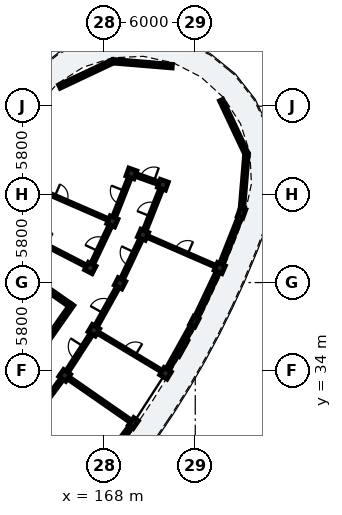
"""IFC4 building model, lengths in metres.
Left out: names, types, materials, properties, quantities, classifications, styles, units other than length and angle.
Written with IfcOpenShell. Run it as: python <this file> out.ifc"""

import sys

from ifc_helpers import new_model, si_unit, direction, frame, frame_2d, origin, origin_2d, place, context, subcontext, project, spatial, rectangle, extrude, element, fill, save


model = new_model("IFC4")
c1 = context("Model", 3, precision=1e-05, world=origin(), true_north=direction((0.0, 1.0)))
c2 = subcontext(c1, "Body", "Model", "MODEL_VIEW")
j1 = project(units=[si_unit("LENGTHUNIT", "METRE"), si_unit("PLANEANGLEUNIT", "RADIAN")], contexts=[c1])
p1 = place(None, origin())
s1 = spatial("IfcSite", under=j1, at=p1, CompositionType="ELEMENT")
p2 = place(p1, origin())
s2 = spatial("IfcBuilding", under=s1, at=p2, CompositionType="ELEMENT")
p3 = place(p2, frame((0.0, 0.0, 22.28)))
s3 = spatial("IfcBuildingStorey", under=s2, at=p3, CompositionType="ELEMENT", Elevation=22.28)
p4 = place(p3, frame((165.733, 38.336, 0.0), z_axis=(0.0, 0.0, 1.0), x_axis=(-0.819153711596, 0.573574055182, 0.0)))
e1 = element("IfcWall", 1, at=p4, inside=s3, PredefinedType="SHEAR", context=c2, shape_type="SweptSolid", body=[
    extrude(rectangle(XDim=6.6, YDim=0.25, at=frame_2d((3.3, 0.0))), origin(), (0.0, 0.0, 1.0), 3.11),
])
p5 = place(p3, frame((165.907, 38.366, 0.0), z_axis=(0.0, 0.0, 1.0), x_axis=(-0.573582112484, -0.819148069789, 0.0)))
e2 = element("IfcWall", 2, at=p5, inside=s3, PredefinedType="SHEAR", context=c2, shape_type="SweptSolid", body=[
    extrude(rectangle(XDim=3.42, YDim=0.25, at=frame_2d((1.71, 0.0))), origin(), (0.0, 0.0, 1.0), 3.11),
])
p6 = place(p3, frame((165.41, 33.692, 0.0), z_axis=(0.0, 0.0, 1.0), x_axis=(0.821646937942, -0.569996762596, 0.0)))
e3 = element("IfcColumn", 3, at=p6, inside=s3, PredefinedType="COLUMN", context=c2, shape_type="SweptSolid", body=[
    extrude(rectangle(XDim=0.56, YDim=0.56, at=origin_2d()), origin(), (0.0, 0.0, 1.0), 3.11),
])
p7 = place(p3, frame((169.929, 30.557, 0.0), z_axis=(0.0, 0.0, 1.0), x_axis=(0.821646937942, -0.569996762596, 0.0)))
e4 = element("IfcColumn", 4, at=p7, inside=s3, PredefinedType="PILASTER", context=c2, shape_type="SweptSolid", body=[
    extrude(rectangle(XDim=0.38, YDim=0.62, at=origin_2d()), origin(), (0.0, 0.0, 1.0), 3.11),
])
for number, where, z_axis, x_axis in (
    (5, (167.33, 36.662, 0.0), (0.0, 0.0, 1.0), (0.857, -0.515, 0.0)),
    (6, (172.044, 33.83, 0.0), (0.0, 0.0, 1.0), (0.857, -0.515, 0.0)),
    (7, (167.095, 40.759, 0.0), (0.0, 0.0, 1.0), (0.889, -0.458, 0.0)),
    (8, (169.051, 39.752, 0.0), (0.0, 0.0, 1.0), (0.889, -0.458, 0.0)),
):
    element("IfcColumn", number, at=place(p3, frame(where, z_axis=z_axis, x_axis=x_axis)), inside=s3, PredefinedType="COLUMN", context=c2, shape_type="SweptSolid", body=[
        extrude(rectangle(XDim=0.56, YDim=0.56, at=origin_2d()), origin(), (0.0, 0.0, 1.0), 3.11),
    ])
p8 = place(p3, frame((173.941, 37.234, 0.0), z_axis=(0.0, 0.0, 1.0), x_axis=(0.889017141486, -0.457873915117, 0.0)))
e9 = element("IfcColumn", 9, at=p8, inside=s3, PredefinedType="PILASTER", context=c2, shape_type="SweptSolid", body=[
    extrude(rectangle(XDim=0.38, YDim=0.62, at=origin_2d()), origin(), (0.0, 0.0, 1.0), 3.11),
])
for number, where, z_axis, x_axis in (
    (10, (168.55, 43.825, 0.0), (0.0, 0.0, 1.0), (0.917, -0.399, 0.0)),
    (11, (170.567, 42.948, 0.0), (0.0, 0.0, 1.0), (0.917, -0.399, 0.0)),
    (12, (175.611, 40.754, 0.0), (0.0, 0.0, 1.0), (0.917, -0.399, 0.0)),
    (13, (169.8, 46.979, 0.0), (0.0, 0.0, 1.0), (0.941, -0.338, 0.0)),
    (14, (171.871, 46.236, 0.0), (0.0, 0.0, 1.0), (0.941, -0.338, 0.0)),
):
    element("IfcColumn", number, at=place(p3, frame(where, z_axis=z_axis, x_axis=x_axis)), inside=s3, PredefinedType="COLUMN", context=c2, shape_type="SweptSolid", body=[
        extrude(rectangle(XDim=0.56, YDim=0.56, at=origin_2d()), origin(), (0.0, 0.0, 1.0), 3.11),
    ])
p9 = place(p3, frame((177.047, 44.377, 0.0), z_axis=(0.0, 0.0, 1.0), x_axis=(0.941176015256, -0.337916718003, 0.0)))
e15 = element("IfcColumn", 15, at=p9, inside=s3, PredefinedType="PILASTER", context=c2, shape_type="SweptSolid", body=[
    extrude(rectangle(XDim=0.38, YDim=0.62, at=origin_2d()), origin(), (0.0, 0.0, 1.0), 3.11),
])
p10 = place(p3, frame((167.753, 27.63, 0.0), z_axis=(0.0, 0.0, 1.0), x_axis=(0.596611432616, 0.802530247699, 0.0)))
e16 = element("IfcWall", 16, at=p10, inside=s3, PredefinedType="SOLIDWALL", context=c2, shape_type="SweptSolid", body=[
    extrude(rectangle(XDim=3.487, YDim=0.24, at=frame_2d((1.743, 0.0))), origin(), (0.0, 0.0, 1.0), 2.355),
])
p11 = place(p10, frame((1.153, 0.0, 0.55)))
e17 = element("IfcOpeningElement", 17, at=p11, cuts=e16, PredefinedType="OPENING", context=c2, shape_type="SweptSolid", body=[
    extrude(rectangle(XDim=1.18, YDim=1.48, at=frame_2d((0.59, 0.74))), frame((0.0, 0.13, 0.0), z_axis=(0.0, -1.0, 0.0), x_axis=(1.0, 0.0, 0.0)), (0.0, 0.0, 1.0), 0.26),
])
p12 = place(p3, frame((172.166, 34.048, 0.0), z_axis=(0.0, 0.0, 1.0), x_axis=(0.486706738221, 0.87356542455, 0.0)))
e18 = element("IfcWall", 18, at=p12, inside=s3, PredefinedType="SOLIDWALL", context=c2, shape_type="SweptSolid", body=[
    extrude(rectangle(XDim=3.487, YDim=0.24, at=frame_2d((1.743, 0.0))), origin(), (0.0, 0.0, 1.0), 2.355),
])
p13 = place(p12, frame((1.143, 0.0, 0.55)))
e19 = element("IfcOpeningElement", 19, at=p13, cuts=e18, PredefinedType="OPENING", context=c2, shape_type="SweptSolid", body=[
    extrude(rectangle(XDim=1.2, YDim=1.51, at=frame_2d((0.6, 0.755))), frame((0.0, 0.13, 0.0), z_axis=(0.0, -1.0, 0.0), x_axis=(1.0, 0.0, 0.0)), (0.0, 0.0, 1.0), 0.26),
])
p14 = place(p3, frame((174.01, 37.378, 0.0), z_axis=(0.0, 0.0, 1.0), x_axis=(0.428576879122, 0.903505317462, 0.0)))
e20 = element("IfcWall", 20, at=p14, inside=s3, PredefinedType="SOLIDWALL", context=c2, shape_type="SweptSolid", body=[
    extrude(rectangle(XDim=3.487, YDim=0.24, at=frame_2d((1.743, 0.0))), origin(), (0.0, 0.0, 1.0), 2.355),
])
p15 = place(p14, frame((1.083, 0.0, 0.55)))
e21 = element("IfcOpeningElement", 21, at=p15, cuts=e20, PredefinedType="OPENING", context=c2, shape_type="SweptSolid", body=[
    extrude(rectangle(XDim=1.32, YDim=1.585, at=frame_2d((0.66, 0.792))), frame((0.0, 0.13, 0.0), z_axis=(0.0, -1.0, 0.0), x_axis=(1.0, 0.0, 0.0)), (0.0, 0.0, 1.0), 0.26),
])
p16 = place(p3, frame((175.703, 40.987, 0.0), z_axis=(0.0, 0.0, 1.0), x_axis=(0.368503667074, 0.929626294461, 0.0)))
e22 = element("IfcWall", 22, at=p16, inside=s3, PredefinedType="SOLIDWALL", context=c2, shape_type="SweptSolid", body=[
    extrude(rectangle(XDim=3.487, YDim=0.24, at=frame_2d((1.743, 0.0))), origin(), (0.0, 0.0, 1.0), 2.355),
])
p17 = place(p16, frame((1.023, 0.0, 0.35)))
e23 = element("IfcOpeningElement", 23, at=p17, cuts=e22, PredefinedType="OPENING", context=c2, shape_type="SweptSolid", body=[
    extrude(rectangle(XDim=1.44, YDim=1.66, at=frame_2d((0.72, 0.83))), frame((0.0, 0.13, 0.0), z_axis=(0.0, -1.0, 0.0), x_axis=(1.0, 0.0, 0.0)), (0.0, 0.0, 1.0), 0.26),
])
p18 = place(p3, frame((165.063, 52.691, 0.0), z_axis=(0.0, 0.0, 1.0), x_axis=(0.904437504678, 0.426606141694, 0.0)))
e24 = element("IfcWall", 24, at=p18, inside=s3, PredefinedType="SOLIDWALL", context=c2, shape_type="SweptSolid", body=[
    extrude(rectangle(XDim=3.908, YDim=0.24, at=frame_2d((1.954, 0.0))), origin(), (0.0, 0.0, 1.0), 2.355),
])
p19 = place(p18, frame((0.979, 0.0, 0.4)))
e25 = element("IfcOpeningElement", 25, at=p19, cuts=e24, PredefinedType="OPENING", context=c2, shape_type="SweptSolid", body=[
    extrude(rectangle(XDim=1.95, YDim=1.78, at=frame_2d((0.975, 0.89))), frame((0.0, 0.13, 0.0), z_axis=(0.0, -1.0, 0.0), x_axis=(1.0, 0.0, 0.0)), (0.0, 0.0, 1.0), 0.26),
])
p20 = place(p3, frame((168.598, 54.358, 0.0), z_axis=(0.0, 0.0, 1.0), x_axis=(0.99656339927, -0.082833515165, 0.0)))
e26 = element("IfcWall", 26, at=p20, inside=s3, PredefinedType="SOLIDWALL", context=c2, shape_type="SweptSolid", body=[
    extrude(rectangle(XDim=3.908, YDim=0.24, at=frame_2d((1.954, 0.0))), origin(), (0.0, 0.0, 1.0), 2.355),
])
p21 = place(p3, frame((175.704, 51.807, 0.0), z_axis=(0.0, 0.0, 1.0), x_axis=(0.42653093848, -0.904472972796, 0.0)))
e27 = element("IfcWall", 27, at=p21, inside=s3, PredefinedType="SOLIDWALL", context=c2, shape_type="SweptSolid", body=[
    extrude(rectangle(XDim=3.908, YDim=0.24, at=frame_2d((1.954, 0.0))), origin(), (0.0, 0.0, 1.0), 2.355),
])
p22 = place(p21, frame((0.979, 0.0, 0.4)))
e28 = element("IfcOpeningElement", 28, at=p22, cuts=e27, PredefinedType="OPENING", context=c2, shape_type="SweptSolid", body=[
    extrude(rectangle(XDim=1.95, YDim=1.78, at=frame_2d((0.975, 0.89))), frame((0.0, 0.13, 0.0), z_axis=(0.0, -1.0, 0.0), x_axis=(1.0, 0.0, 0.0)), (0.0, 0.0, 1.0), 0.26),
])
p23 = place(p3, frame((177.371, 48.272, 0.0), z_axis=(0.0, 0.0, 1.0), x_axis=(-0.082771474592, -0.996568554086, 0.0)))
e29 = element("IfcWall", 29, at=p23, inside=s3, PredefinedType="SOLIDWALL", context=c2, shape_type="SweptSolid", body=[
    extrude(rectangle(XDim=3.908, YDim=0.24, at=frame_2d((1.954, 0.0))), origin(), (0.0, 0.0, 1.0), 2.355),
])
p24 = place(p3, frame((163.509, 31.134, 0.0), z_axis=(0.0, 0.0, 1.0), x_axis=(0.596552136601, 0.802574325727, 0.0)))
e30 = element("IfcWall", 30, at=p24, inside=s3, PredefinedType="PARTITIONING", context=c2, shape_type="SweptSolid", body=[
    extrude(rectangle(XDim=2.837, YDim=0.195, at=frame_2d((1.418, 0.0))), origin(), (0.0, 0.0, 1.0), 2.37),
])
p25 = place(p24, frame((0.954, 0.0, 0.0)))
e31 = element("IfcOpeningElement", 31, at=p25, cuts=e30, PredefinedType="OPENING", context=c2, shape_type="SweptSolid", body=[
    extrude(rectangle(XDim=0.93, YDim=2.12, at=frame_2d((0.465, 1.06))), frame((0.0, 0.107, 0.0), z_axis=(0.0, -1.0, 0.0), x_axis=(1.0, 0.0, 0.0)), (0.0, 0.0, 1.0), 0.215),
])
p26 = place(p3, frame((165.739, 33.464, 0.0), z_axis=(0.0, 0.0, 1.0), x_axis=(0.821638260647, -0.570009270663, 0.0)))
e32 = element("IfcWall", 32, at=p26, inside=s3, PredefinedType="PARTITIONING", context=c2, shape_type="SweptSolid", body=[
    extrude(rectangle(XDim=4.7, YDim=0.175, at=frame_2d((2.35, 0.0))), origin(), (0.0, 0.0, 1.0), 2.37),
])
p27 = place(p3, frame((165.6, 33.986, 0.0), z_axis=(0.0, 0.0, 1.0), x_axis=(0.542787304957, 0.83987019329, 0.0)))
e33 = element("IfcWall", 33, at=p27, inside=s3, PredefinedType="PARTITIONING", context=c2, shape_type="SweptSolid", body=[
    extrude(rectangle(XDim=2.837, YDim=0.195, at=frame_2d((1.418, 0.0))), origin(), (0.0, 0.0, 1.0), 2.37),
])
p28 = place(p27, frame((0.924, 0.0, 0.0)))
e34 = element("IfcOpeningElement", 34, at=p28, cuts=e33, PredefinedType="OPENING", context=c2, shape_type="SweptSolid", body=[
    extrude(rectangle(XDim=0.99, YDim=2.16, at=frame_2d((0.495, 1.08))), frame((0.0, 0.107, 0.0), z_axis=(0.0, -1.0, 0.0), x_axis=(1.0, 0.0, 0.0)), (0.0, 0.0, 1.0), 0.215),
])
p29 = place(p3, frame((167.673, 36.456, 0.0), z_axis=(0.0, 0.0, 1.0), x_axis=(0.857139805444, -0.515083831937, 0.0)))
e35 = element("IfcWall", 35, at=p29, inside=s3, PredefinedType="PARTITIONING", context=c2, shape_type="SweptSolid", body=[
    extrude(rectangle(XDim=4.7, YDim=0.125, at=frame_2d((2.35, 0.0))), origin(), (0.0, 0.0, 1.0), 2.37),
])
p30 = place(p29, frame((1.915, 0.0, 0.0)))
e36 = element("IfcOpeningElement", 36, at=p30, cuts=e35, PredefinedType="OPENING", context=c2, shape_type="SweptSolid", body=[
    extrude(rectangle(XDim=0.87, YDim=2.08, at=frame_2d((0.435, 1.04))), frame((0.0, 0.073, 0.0), z_axis=(0.0, -1.0, 0.0), x_axis=(1.0, 0.0, 0.0)), (0.0, 0.0, 1.0), 0.145),
])
p31 = place(p3, frame((167.5, 36.968, 0.0), z_axis=(0.0, 0.0, 1.0), x_axis=(0.48673124079, 0.8735517725, 0.0)))
e37 = element("IfcWall", 37, at=p31, inside=s3, PredefinedType="PARTITIONING", context=c2, shape_type="SweptSolid", body=[
    extrude(rectangle(XDim=2.837, YDim=0.195, at=frame_2d((1.418, 0.0))), origin(), (0.0, 0.0, 1.0), 2.37),
])
p32 = place(p31, frame((0.934, 0.0, 0.0)))
e38 = element("IfcOpeningElement", 38, at=p32, cuts=e37, PredefinedType="OPENING", context=c2, shape_type="SweptSolid", body=[
    extrude(rectangle(XDim=0.97, YDim=2.15, at=frame_2d((0.485, 1.075))), frame((0.0, 0.107, 0.0), z_axis=(0.0, -1.0, 0.0), x_axis=(1.0, 0.0, 0.0)), (0.0, 0.0, 1.0), 0.215),
])
p33 = place(p3, frame((160.872, 43.964, 0.0), z_axis=(0.0, 0.0, 1.0), x_axis=(0.889022010753, -0.457864460727, 0.0)))
e39 = element("IfcWall", 39, at=p33, inside=s3, PredefinedType="PARTITIONING", context=c2, shape_type="SweptSolid", body=[
    extrude(rectangle(XDim=6.6, YDim=0.125, at=frame_2d((3.3, 0.0))), origin(), (0.0, 0.0, 1.0), 2.37),
])
p34 = place(p33, frame((2.855, 0.0, 0.0)))
e40 = element("IfcOpeningElement", 40, at=p34, cuts=e39, PredefinedType="OPENING", context=c2, shape_type="SweptSolid", body=[
    extrude(rectangle(XDim=0.89, YDim=2.1, at=frame_2d((0.445, 1.05))), frame((0.0, 0.073, 0.0), z_axis=(0.0, -1.0, 0.0), x_axis=(1.0, 0.0, 0.0)), (0.0, 0.0, 1.0), 0.145),
])
p35 = place(p3, frame((169.201, 40.068, 0.0), z_axis=(0.0, 0.0, 1.0), x_axis=(0.428493237107, 0.903544988229, 0.0)))
e41 = element("IfcWall", 41, at=p35, inside=s3, PredefinedType="PARTITIONING", context=c2, shape_type="SweptSolid", body=[
    extrude(rectangle(XDim=2.837, YDim=0.195, at=frame_2d((1.418, 0.0))), origin(), (0.0, 0.0, 1.0), 2.37),
])
p36 = place(p35, frame((0.944, 0.0, 0.0)))
e42 = element("IfcOpeningElement", 42, at=p36, cuts=e41, PredefinedType="OPENING", context=c2, shape_type="SweptSolid", body=[
    extrude(rectangle(XDim=0.95, YDim=2.13, at=frame_2d((0.475, 1.065))), frame((0.0, 0.107, 0.0), z_axis=(0.0, -1.0, 0.0), x_axis=(1.0, 0.0, 0.0)), (0.0, 0.0, 1.0), 0.215),
])
p37 = place(p3, frame((167.246, 41.075, 0.0), z_axis=(0.0, 0.0, 1.0), x_axis=(0.428550049392, 0.903518043631, 0.0)))
e43 = element("IfcWall", 43, at=p37, inside=s3, PredefinedType="PARTITIONING", context=c2, shape_type="SweptSolid", body=[
    extrude(rectangle(XDim=2.693, YDim=0.195, at=frame_2d((1.346, 0.0))), origin(), (0.0, 0.0, 1.0), 2.37),
])
p38 = place(p37, frame((0.872, 0.0, 0.0)))
e44 = element("IfcOpeningElement", 44, at=p38, cuts=e43, PredefinedType="OPENING", context=c2, shape_type="SweptSolid", body=[
    extrude(rectangle(XDim=0.95, YDim=2.13, at=frame_2d((0.475, 1.065))), frame((0.0, 0.107, 0.0), z_axis=(0.0, -1.0, 0.0), x_axis=(1.0, 0.0, 0.0)), (0.0, 0.0, 1.0), 0.215),
])
p39 = place(p3, frame((170.934, 42.788, 0.0), z_axis=(0.0, 0.0, 1.0), x_axis=(0.917071707884, -0.398722312643, 0.0)))
e45 = element("IfcWall", 45, at=p39, inside=s3, PredefinedType="PARTITIONING", context=c2, shape_type="SweptSolid", body=[
    extrude(rectangle(XDim=4.7, YDim=0.125, at=frame_2d((2.35, 0.0))), origin(), (0.0, 0.0, 1.0), 2.37),
])
p40 = place(p39, frame((1.905, 0.0, 0.0)))
e46 = element("IfcOpeningElement", 46, at=p40, cuts=e45, PredefinedType="OPENING", context=c2, shape_type="SweptSolid", body=[
    extrude(rectangle(XDim=0.89, YDim=2.1, at=frame_2d((0.445, 1.05))), frame((0.0, 0.073, 0.0), z_axis=(0.0, -1.0, 0.0), x_axis=(1.0, 0.0, 0.0)), (0.0, 0.0, 1.0), 0.145),
])
p41 = place(p3, frame((162.13, 46.616, 0.0), z_axis=(0.0, 0.0, 1.0), x_axis=(0.9170582943, -0.398753162817, 0.0)))
e47 = element("IfcWall", 47, at=p41, inside=s3, PredefinedType="PARTITIONING", context=c2, shape_type="SweptSolid", body=[
    extrude(rectangle(XDim=6.6, YDim=0.125, at=frame_2d((3.3, 0.0))), origin(), (0.0, 0.0, 1.0), 2.37),
])
p42 = place(p41, frame((2.865, 0.0, 0.0)))
e48 = element("IfcOpeningElement", 48, at=p42, cuts=e47, PredefinedType="OPENING", context=c2, shape_type="SweptSolid", body=[
    extrude(rectangle(XDim=0.87, YDim=2.08, at=frame_2d((0.435, 1.04))), frame((0.0, 0.073, 0.0), z_axis=(0.0, -1.0, 0.0), x_axis=(1.0, 0.0, 0.0)), (0.0, 0.0, 1.0), 0.145),
])
p43 = place(p3, frame((170.696, 43.273, 0.0), z_axis=(0.0, 0.0, 1.0), x_axis=(0.368584691693, 0.929594172233, 0.0)))
e49 = element("IfcWall", 49, at=p43, inside=s3, PredefinedType="PARTITIONING", context=c2, shape_type="SweptSolid", body=[
    extrude(rectangle(XDim=2.837, YDim=0.195, at=frame_2d((1.418, 0.0))), origin(), (0.0, 0.0, 1.0), 2.37),
])
p44 = place(p43, frame((0.954, 0.0, 0.0)))
e50 = element("IfcOpeningElement", 50, at=p44, cuts=e49, PredefinedType="OPENING", context=c2, shape_type="SweptSolid", body=[
    extrude(rectangle(XDim=0.93, YDim=2.12, at=frame_2d((0.465, 1.06))), frame((0.0, 0.107, 0.0), z_axis=(0.0, -1.0, 0.0), x_axis=(1.0, 0.0, 0.0)), (0.0, 0.0, 1.0), 0.215),
])
p45 = place(p3, frame((168.678, 44.15, 0.0), z_axis=(0.0, 0.0, 1.0), x_axis=(0.368528468945, 0.929616462622, 0.0)))
e51 = element("IfcWall", 51, at=p45, inside=s3, PredefinedType="PARTITIONING", context=c2, shape_type="SweptSolid", body=[
    extrude(rectangle(XDim=2.693, YDim=0.195, at=frame_2d((1.346, 0.0))), origin(), (0.0, 0.0, 1.0), 2.37),
])
p46 = place(p45, frame((0.882, 0.0, 0.0)))
e52 = element("IfcOpeningElement", 52, at=p46, cuts=e51, PredefinedType="OPENING", context=c2, shape_type="SweptSolid", body=[
    extrude(rectangle(XDim=0.93, YDim=2.12, at=frame_2d((0.465, 1.06))), frame((0.0, 0.107, 0.0), z_axis=(0.0, -1.0, 0.0), x_axis=(1.0, 0.0, 0.0)), (0.0, 0.0, 1.0), 0.215),
])
p47 = place(p3, frame((169.847, 46.962, 0.0), z_axis=(0.0, 0.0, 1.0), x_axis=(0.941167179085, -0.337941327767, 0.0)))
e53 = element("IfcWall", 53, at=p47, inside=s3, PredefinedType="PARTITIONING", context=c2, shape_type="SweptSolid", body=[
    extrude(rectangle(XDim=2.1, YDim=0.195, at=frame_2d((1.05, 0.0))), origin(), (0.0, 0.0, 1.0), 2.37),
])
p48 = place(p47, frame((0.57, 0.0, 0.0)))
e54 = element("IfcOpeningElement", 54, at=p48, cuts=e53, PredefinedType="OPENING", context=c2, shape_type="SweptSolid", body=[
    extrude(rectangle(XDim=0.95, YDim=2.13, at=frame_2d((0.475, 1.065))), frame((0.0, 0.107, 0.0), z_axis=(0.0, -1.0, 0.0), x_axis=(1.0, 0.0, 0.0)), (0.0, 0.0, 1.0), 0.215),
])
p49 = place(p13, origin())
e55 = element("IfcWindow", 55, at=p49, inside=s3, PartitioningType="SINGLE_PANEL", PredefinedType="WINDOW", context=c2, shape_type="SweptSolid", body=[
    extrude(rectangle(XDim=1.2, YDim=1.51, at=frame_2d((0.6, 0.755))), frame((0.0, 0.03, 0.0), z_axis=(0.0, -1.0, 0.0), x_axis=(1.0, 0.0, 0.0)), (0.0, 0.0, 1.0), 0.06),
])
fill(e19, e55)
p50 = place(p15, origin())
e56 = element("IfcWindow", 56, at=p50, inside=s3, PartitioningType="SINGLE_PANEL", PredefinedType="WINDOW", context=c2, shape_type="SweptSolid", body=[
    extrude(rectangle(XDim=1.32, YDim=1.585, at=frame_2d((0.66, 0.792))), frame((0.0, 0.03, 0.0), z_axis=(0.0, -1.0, 0.0), x_axis=(1.0, 0.0, 0.0)), (0.0, 0.0, 1.0), 0.06),
])
fill(e21, e56)
p51 = place(p17, origin())
e57 = element("IfcWindow", 57, at=p51, inside=s3, PartitioningType="SINGLE_PANEL", PredefinedType="WINDOW", context=c2, shape_type="SweptSolid", body=[
    extrude(rectangle(XDim=1.44, YDim=1.66, at=frame_2d((0.72, 0.83))), frame((0.0, 0.03, 0.0), z_axis=(0.0, -1.0, 0.0), x_axis=(1.0, 0.0, 0.0)), (0.0, 0.0, 1.0), 0.06),
])
fill(e23, e57)
p52 = place(p19, origin())
e58 = element("IfcWindow", 58, at=p52, inside=s3, PartitioningType="SINGLE_PANEL", PredefinedType="WINDOW", context=c2, shape_type="SweptSolid", body=[
    extrude(rectangle(XDim=1.95, YDim=1.78, at=frame_2d((0.975, 0.89))), frame((0.0, 0.03, 0.0), z_axis=(0.0, -1.0, 0.0), x_axis=(1.0, 0.0, 0.0)), (0.0, 0.0, 1.0), 0.06),
])
fill(e25, e58)
p53 = place(p22, origin())
e59 = element("IfcWindow", 59, at=p53, inside=s3, PartitioningType="SINGLE_PANEL", PredefinedType="WINDOW", context=c2, shape_type="SweptSolid", body=[
    extrude(rectangle(XDim=1.95, YDim=1.78, at=frame_2d((0.975, 0.89))), frame((0.0, 0.03, 0.0), z_axis=(0.0, -1.0, 0.0), x_axis=(1.0, 0.0, 0.0)), (0.0, 0.0, 1.0), 0.06),
])
fill(e28, e59)
p54 = place(p25, origin())
e60 = element("IfcDoor", 60, at=p54, inside=s3, OperationType="SINGLE_SWING_LEFT", PredefinedType="DOOR", context=c2, shape_type="SweptSolid", body=[
    extrude(rectangle(XDim=0.93, YDim=2.12, at=frame_2d((0.465, 1.06))), frame((0.0, 0.025, 0.0), z_axis=(0.0, -1.0, 0.0), x_axis=(1.0, 0.0, 0.0)), (0.0, 0.0, 1.0), 0.05),
])
fill(e31, e60)
p55 = place(p28, origin())
e61 = element("IfcDoor", 61, at=p55, inside=s3, OperationType="SINGLE_SWING_RIGHT", PredefinedType="DOOR", context=c2, shape_type="SweptSolid", body=[
    extrude(rectangle(XDim=0.99, YDim=2.16, at=frame_2d((0.495, 1.08))), frame((0.0, 0.025, 0.0), z_axis=(0.0, -1.0, 0.0), x_axis=(1.0, 0.0, 0.0)), (0.0, 0.0, 1.0), 0.05),
])
fill(e34, e61)
p56 = place(p30, origin())
e62 = element("IfcDoor", 62, at=p56, inside=s3, OperationType="SINGLE_SWING_RIGHT", PredefinedType="DOOR", context=c2, shape_type="SweptSolid", body=[
    extrude(rectangle(XDim=0.87, YDim=2.08, at=frame_2d((0.435, 1.04))), frame((0.0, 0.025, 0.0), z_axis=(0.0, -1.0, 0.0), x_axis=(1.0, 0.0, 0.0)), (0.0, 0.0, 1.0), 0.05),
])
fill(e36, e62)
p57 = place(p32, origin())
e63 = element("IfcDoor", 63, at=p57, inside=s3, OperationType="SINGLE_SWING_LEFT", PredefinedType="DOOR", context=c2, shape_type="SweptSolid", body=[
    extrude(rectangle(XDim=0.97, YDim=2.15, at=frame_2d((0.485, 1.075))), frame((0.0, 0.025, 0.0), z_axis=(0.0, -1.0, 0.0), x_axis=(1.0, 0.0, 0.0)), (0.0, 0.0, 1.0), 0.05),
])
fill(e38, e63)
p58 = place(p36, origin())
e64 = element("IfcDoor", 64, at=p58, inside=s3, OperationType="SINGLE_SWING_RIGHT", PredefinedType="DOOR", context=c2, shape_type="SweptSolid", body=[
    extrude(rectangle(XDim=0.95, YDim=2.13, at=frame_2d((0.475, 1.065))), frame((0.0, 0.025, 0.0), z_axis=(0.0, -1.0, 0.0), x_axis=(1.0, 0.0, 0.0)), (0.0, 0.0, 1.0), 0.05),
])
fill(e42, e64)
p59 = place(p38, origin())
e65 = element("IfcDoor", 65, at=p59, inside=s3, OperationType="SINGLE_SWING_LEFT", PredefinedType="DOOR", context=c2, shape_type="SweptSolid", body=[
    extrude(rectangle(XDim=0.95, YDim=2.13, at=frame_2d((0.475, 1.065))), frame((0.0, 0.025, 0.0), z_axis=(0.0, -1.0, 0.0), x_axis=(1.0, 0.0, 0.0)), (0.0, 0.0, 1.0), 0.05),
])
fill(e44, e65)
p60 = place(p40, origin())
e66 = element("IfcDoor", 66, at=p60, inside=s3, OperationType="SINGLE_SWING_RIGHT", PredefinedType="DOOR", context=c2, shape_type="SweptSolid", body=[
    extrude(rectangle(XDim=0.89, YDim=2.1, at=frame_2d((0.445, 1.05))), frame((0.0, 0.025, 0.0), z_axis=(0.0, -1.0, 0.0), x_axis=(1.0, 0.0, 0.0)), (0.0, 0.0, 1.0), 0.05),
])
fill(e46, e66)
p61 = place(p42, origin())
e67 = element("IfcDoor", 67, at=p61, inside=s3, OperationType="SINGLE_SWING_LEFT", PredefinedType="DOOR", context=c2, shape_type="SweptSolid", body=[
    extrude(rectangle(XDim=0.87, YDim=2.08, at=frame_2d((0.435, 1.04))), frame((0.0, 0.025, 0.0), z_axis=(0.0, -1.0, 0.0), x_axis=(1.0, 0.0, 0.0)), (0.0, 0.0, 1.0), 0.05),
])
fill(e48, e67)
p62 = place(p44, origin())
e68 = element("IfcDoor", 68, at=p62, inside=s3, OperationType="SINGLE_SWING_LEFT", PredefinedType="DOOR", context=c2, shape_type="SweptSolid", body=[
    extrude(rectangle(XDim=0.93, YDim=2.12, at=frame_2d((0.465, 1.06))), frame((0.0, 0.025, 0.0), z_axis=(0.0, -1.0, 0.0), x_axis=(1.0, 0.0, 0.0)), (0.0, 0.0, 1.0), 0.05),
])
fill(e50, e68)
p63 = place(p46, origin())
e69 = element("IfcDoor", 69, at=p63, inside=s3, OperationType="SINGLE_SWING_RIGHT", PredefinedType="DOOR", context=c2, shape_type="SweptSolid", body=[
    extrude(rectangle(XDim=0.93, YDim=2.12, at=frame_2d((0.465, 1.06))), frame((0.0, 0.025, 0.0), z_axis=(0.0, -1.0, 0.0), x_axis=(1.0, 0.0, 0.0)), (0.0, 0.0, 1.0), 0.05),
])
fill(e52, e69)
p64 = place(p48, origin())
e70 = element("IfcDoor", 70, at=p64, inside=s3, OperationType="SINGLE_SWING_RIGHT", PredefinedType="DOOR", context=c2, shape_type="SweptSolid", body=[
    extrude(rectangle(XDim=0.95, YDim=2.13, at=frame_2d((0.475, 1.065))), frame((0.0, 0.025, 0.0), z_axis=(0.0, -1.0, 0.0), x_axis=(1.0, 0.0, 0.0)), (0.0, 0.0, 1.0), 0.05),
])
fill(e54, e70)
save(model, sys.argv[1])
